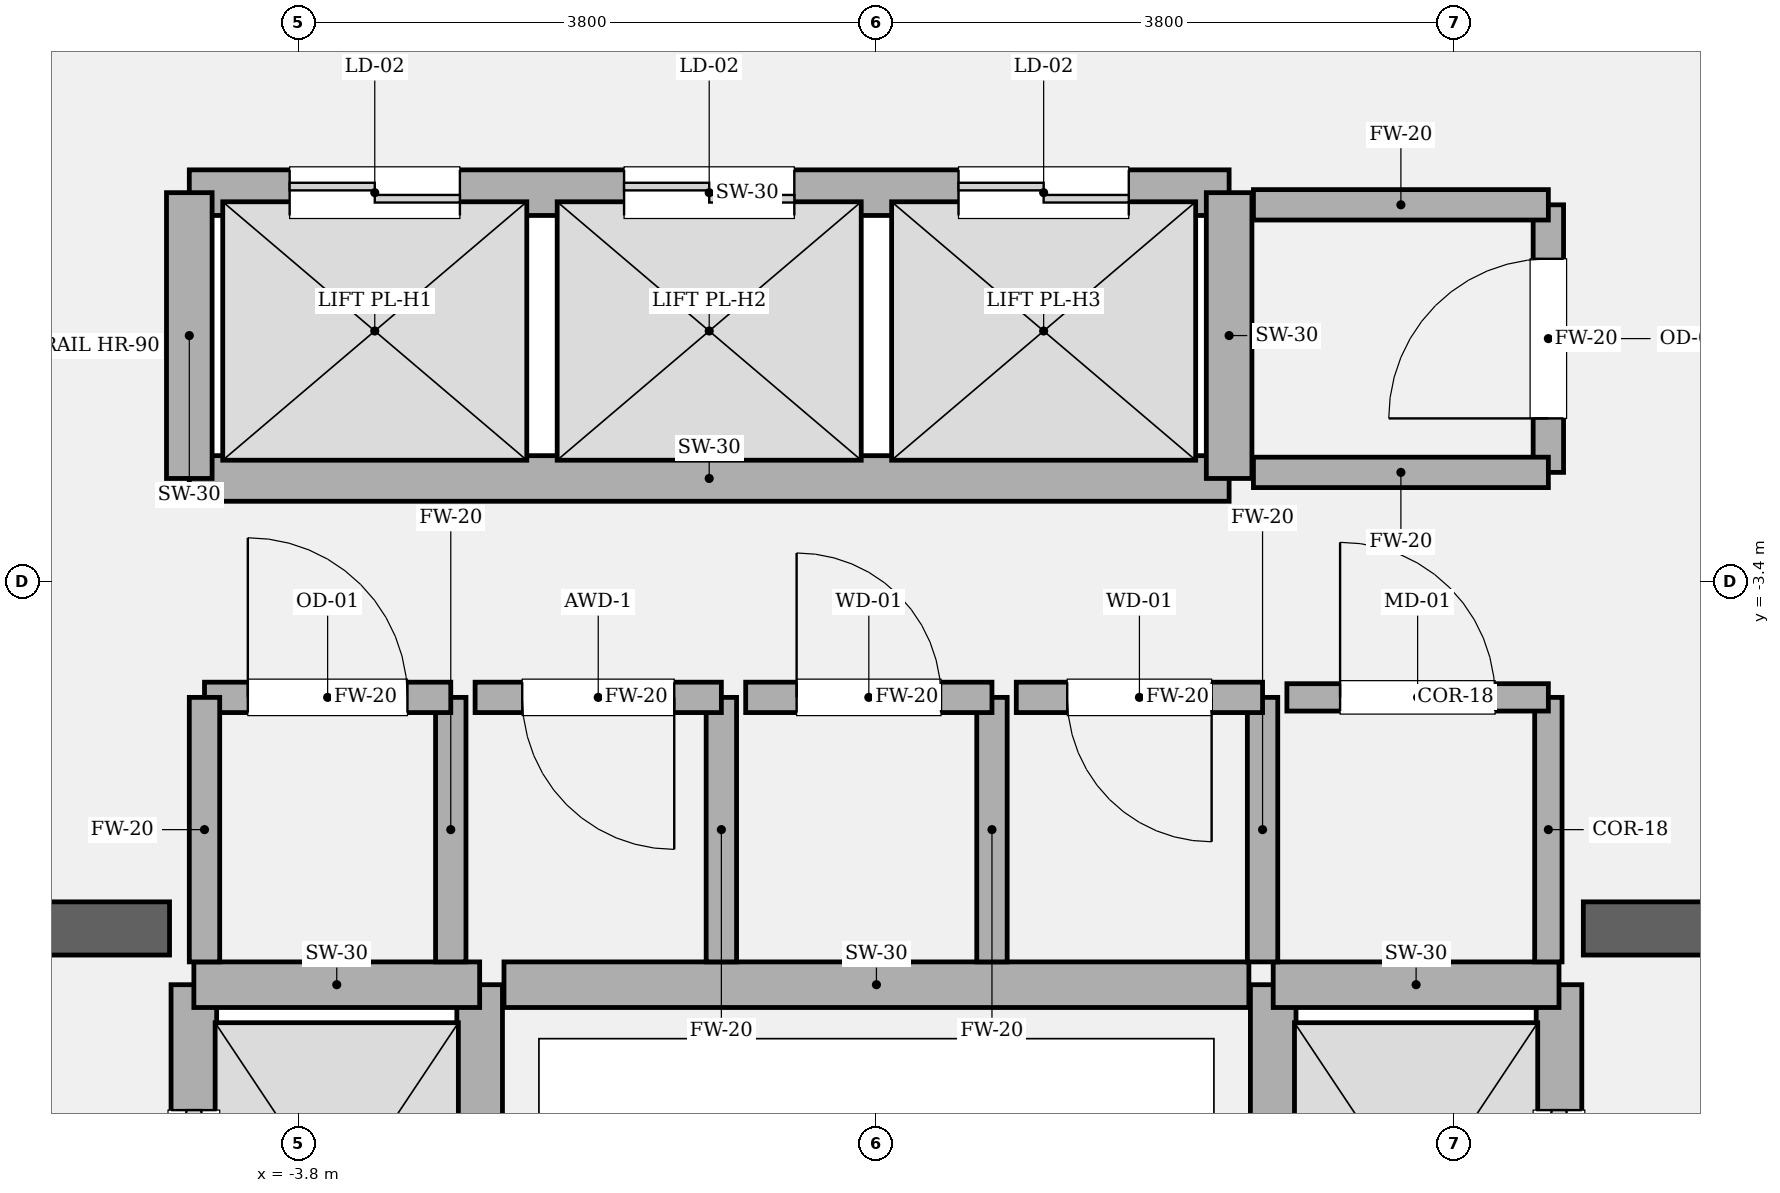
"""IFC4 building model, lengths in metres.
Left out: names, types, materials, properties, quantities, classifications, styles, units other than length and angle.
Written with IfcOpenShell. Run it as: python <this file> out.ifc"""

import sys

from ifc_helpers import new_model, si_unit, direction, frame, frame_2d, origin, place, context, subcontext, project, spatial, rectangle, extrude, element, fill, save


model = new_model("IFC4")
c1 = context("Model", 3, precision=1e-05, world=origin(), true_north=direction((0.0, 1.0)))
c2 = subcontext(c1, "Body", "Model", "MODEL_VIEW")
j1 = project(units=[si_unit("LENGTHUNIT", "METRE"), si_unit("PLANEANGLEUNIT", "RADIAN")], contexts=[c1])
p1 = place(None, origin())
s1 = spatial("IfcSite", under=j1, at=p1, CompositionType="ELEMENT")
p2 = place(p1, origin())
s2 = spatial("IfcBuilding", under=s1, at=p2, CompositionType="ELEMENT")
p3 = place(p2, frame((0.0, 0.0, 271.65)))
s3 = spatial("IfcBuildingStorey", under=s2, at=p3, CompositionType="ELEMENT", Elevation=271.65)
p4 = place(p3, frame((-9.925, -5.68, 0.0), z_axis=(0.0, 0.0, 1.0), x_axis=(1.0, 0.0, 0.0)))
e1 = element("IfcWall", 1, at=p4, inside=s3, PredefinedType="SOLIDWALL", context=c2, shape_type="SweptSolid", body=[
    extrude(rectangle(XDim=5.275, YDim=0.35, at=frame_2d((2.638, 0.0))), origin(), (0.0, 0.0, 1.0), 4.05),
])
p5 = place(p4, frame((1.385, 0.0, 0.0)))
e2 = element("IfcOpeningElement", 2, at=p5, cuts=e1, PredefinedType="OPENING", context=c2, shape_type="SweptSolid", body=[
    extrude(rectangle(XDim=1.18, YDim=2.2, at=frame_2d((0.59, 1.1))), frame((0.0, 0.185, 0.0), z_axis=(0.0, -1.0, 0.0), x_axis=(1.0, 0.0, 0.0)), (0.0, 0.0, 1.0), 0.37),
])
p6 = place(p3, frame((4.65, -5.68, 0.0), z_axis=(0.0, 0.0, 1.0), x_axis=(1.0, 0.0, 0.0)))
e3 = element("IfcWall", 3, at=p6, inside=s3, PredefinedType="SOLIDWALL", context=c2, shape_type="SweptSolid", body=[
    extrude(rectangle(XDim=5.275, YDim=0.35, at=frame_2d((2.638, 0.0))), origin(), (0.0, 0.0, 1.0), 4.05),
])
p7 = place(p6, frame((2.71, 0.0, 0.0)))
e4 = element("IfcOpeningElement", 4, at=p7, cuts=e3, PredefinedType="OPENING", context=c2, shape_type="SweptSolid", body=[
    extrude(rectangle(XDim=1.18, YDim=2.2, at=frame_2d((0.59, 1.1))), frame((0.0, 0.185, 0.0), z_axis=(0.0, -1.0, 0.0), x_axis=(1.0, 0.0, 0.0)), (0.0, 0.0, 1.0), 0.37),
])
p8 = place(p3, frame((-4.49, -8.82, 0.0), z_axis=(0.0, 0.0, 1.0), x_axis=(0.0, 1.0, 0.0)))
e5 = element("IfcWall", 5, at=p8, inside=s3, PredefinedType="SOLIDWALL", context=c2, shape_type="SweptSolid", body=[
    extrude(rectangle(XDim=2.77, YDim=0.3, at=frame_2d((1.385, 0.0))), origin(), (0.0, 0.0, 1.0), 3.85),
])
p9 = place(p8, frame((0.825, 0.0, 0.0)))
e6 = element("IfcOpeningElement", 6, at=p9, cuts=e5, PredefinedType="OPENING", context=c2, shape_type="SweptSolid", body=[
    extrude(rectangle(XDim=1.12, YDim=2.25, at=frame_2d((0.56, 1.125))), frame((0.0, 0.16, 0.0), z_axis=(0.0, -1.0, 0.0), x_axis=(1.0, 0.0, 0.0)), (0.0, 0.0, 1.0), 0.32),
])
p10 = place(p3, frame((-2.61, -8.82, 0.0), z_axis=(0.0, 0.0, 1.0), x_axis=(0.0, 1.0, 0.0)))
e7 = element("IfcWall", 7, at=p10, inside=s3, PredefinedType="SOLIDWALL", context=c2, shape_type="SweptSolid", body=[
    extrude(rectangle(XDim=2.77, YDim=0.3, at=frame_2d((1.385, 0.0))), origin(), (0.0, 0.0, 1.0), 3.85),
])
p11 = place(p3, frame((-4.49, -6.05, 0.0), z_axis=(0.0, 0.0, 1.0), x_axis=(1.0, 0.0, 0.0)))
e8 = element("IfcWall", 8, at=p11, inside=s3, PredefinedType="SOLIDWALL", context=c2, shape_type="SweptSolid", body=[
    extrude(rectangle(XDim=1.88, YDim=0.3, at=frame_2d((0.94, 0.0))), origin(), (0.0, 0.0, 1.0), 3.85),
])
p12 = place(p3, frame((4.49, -8.82, 0.0), z_axis=(0.0, 0.0, 1.0), x_axis=(0.0, 1.0, 0.0)))
e9 = element("IfcWall", 9, at=p12, inside=s3, PredefinedType="SOLIDWALL", context=c2, shape_type="SweptSolid", body=[
    extrude(rectangle(XDim=2.77, YDim=0.3, at=frame_2d((1.385, 0.0))), origin(), (0.0, 0.0, 1.0), 3.85),
])
p13 = place(p12, frame((0.825, 0.0, 0.0)))
e10 = element("IfcOpeningElement", 10, at=p13, cuts=e9, PredefinedType="OPENING", context=c2, shape_type="SweptSolid", body=[
    extrude(rectangle(XDim=1.12, YDim=2.25, at=frame_2d((0.56, 1.125))), frame((0.0, 0.16, 0.0), z_axis=(0.0, -1.0, 0.0), x_axis=(1.0, 0.0, 0.0)), (0.0, 0.0, 1.0), 0.32),
])
p14 = place(p3, frame((2.61, -8.82, 0.0), z_axis=(0.0, 0.0, 1.0), x_axis=(0.0, 1.0, 0.0)))
e11 = element("IfcWall", 11, at=p14, inside=s3, PredefinedType="SOLIDWALL", context=c2, shape_type="SweptSolid", body=[
    extrude(rectangle(XDim=2.77, YDim=0.3, at=frame_2d((1.385, 0.0))), origin(), (0.0, 0.0, 1.0), 3.85),
])
p15 = place(p3, frame((2.61, -6.05, 0.0), z_axis=(0.0, 0.0, 1.0), x_axis=(1.0, 0.0, 0.0)))
e12 = element("IfcWall", 12, at=p15, inside=s3, PredefinedType="SOLIDWALL", context=c2, shape_type="SweptSolid", body=[
    extrude(rectangle(XDim=1.88, YDim=0.3, at=frame_2d((0.94, 0.0))), origin(), (0.0, 0.0, 1.0), 3.85),
])
p16 = place(p3, frame((-4.52, -0.84, 0.0), z_axis=(0.0, 0.0, 1.0), x_axis=(1.0, 0.0, 0.0)))
e13 = element("IfcWall", 13, at=p16, inside=s3, PredefinedType="SOLIDWALL", context=c2, shape_type="SweptSolid", body=[
    extrude(rectangle(XDim=6.84, YDim=0.3, at=frame_2d((3.42, 0.0))), origin(), (0.0, 0.0, 1.0), 3.85),
])
p17 = place(p16, frame((0.66, 0.0, 0.0)))
e14 = element("IfcOpeningElement", 14, at=p17, cuts=e13, PredefinedType="OPENING", context=c2, shape_type="SweptSolid", body=[
    extrude(rectangle(XDim=1.12, YDim=2.25, at=frame_2d((0.56, 1.125))), frame((0.0, 0.16, 0.0), z_axis=(0.0, -1.0, 0.0), x_axis=(1.0, 0.0, 0.0)), (0.0, 0.0, 1.0), 0.32),
])
p18 = place(p16, frame((2.86, 0.0, 0.0)))
e15 = element("IfcOpeningElement", 15, at=p18, cuts=e13, PredefinedType="OPENING", context=c2, shape_type="SweptSolid", body=[
    extrude(rectangle(XDim=1.12, YDim=2.25, at=frame_2d((0.56, 1.125))), frame((0.0, 0.16, 0.0), z_axis=(0.0, -1.0, 0.0), x_axis=(1.0, 0.0, 0.0)), (0.0, 0.0, 1.0), 0.32),
])
p19 = place(p16, frame((5.06, 0.0, 0.0)))
e16 = element("IfcOpeningElement", 16, at=p19, cuts=e13, PredefinedType="OPENING", context=c2, shape_type="SweptSolid", body=[
    extrude(rectangle(XDim=1.12, YDim=2.25, at=frame_2d((0.56, 1.125))), frame((0.0, 0.16, 0.0), z_axis=(0.0, -1.0, 0.0), x_axis=(1.0, 0.0, 0.0)), (0.0, 0.0, 1.0), 0.32),
])
p20 = place(p3, frame((-4.52, -2.72, 0.0), z_axis=(0.0, 0.0, 1.0), x_axis=(1.0, 0.0, 0.0)))
e17 = element("IfcWall", 17, at=p20, inside=s3, PredefinedType="SOLIDWALL", context=c2, shape_type="SweptSolid", body=[
    extrude(rectangle(XDim=6.84, YDim=0.3, at=frame_2d((3.42, 0.0))), origin(), (0.0, 0.0, 1.0), 3.85),
])
for number, where, z_axis, x_axis in (
    (18, (-4.52, -2.72, 0.0), (0.0, 0.0, 1.0), (0.0, 1.0, 0.0)),
    (19, (2.32, -2.72, 0.0), (0.0, 0.0, 1.0), (0.0, 1.0, 0.0)),
):
    element("IfcWall", number, at=place(p3, frame(where, z_axis=z_axis, x_axis=x_axis)), inside=s3, PredefinedType="SOLIDWALL", context=c2, shape_type="SweptSolid", body=[
        extrude(rectangle(XDim=1.88, YDim=0.3, at=frame_2d((0.94, 0.0))), origin(), (0.0, 0.0, 1.0), 3.85),
    ])
p21 = place(p3, frame((-2.45, -6.05, 0.0), z_axis=(0.0, 0.0, 1.0), x_axis=(1.0, 0.0, 0.0)))
e20 = element("IfcWall", 20, at=p21, inside=s3, PredefinedType="SOLIDWALL", context=c2, shape_type="SweptSolid", body=[
    extrude(rectangle(XDim=4.9, YDim=0.3, at=frame_2d((2.45, 0.0))), origin(), (0.0, 0.0, 1.0), 3.85),
])
p22 = place(p3, frame((-2.8, -5.9, 0.0), z_axis=(0.0, 0.0, 1.0), x_axis=(0.0, 1.0, 0.0)))
e21 = element("IfcWall", 21, at=p22, inside=s3, PredefinedType="SOLIDWALL", context=c2, shape_type="SweptSolid", body=[
    extrude(rectangle(XDim=1.74, YDim=0.2, at=frame_2d((0.87, 0.0))), origin(), (0.0, 0.0, 1.0), 3.85),
])
p23 = place(p3, frame((-2.8, -4.16, 0.0), z_axis=(0.0, 0.0, 1.0), x_axis=(-1.0, 0.0, 0.0)))
e22 = element("IfcWall", 22, at=p23, inside=s3, PredefinedType="SOLIDWALL", context=c2, shape_type="SweptSolid", body=[
    extrude(rectangle(XDim=1.62, YDim=0.2, at=frame_2d((0.81, 0.0))), origin(), (0.0, 0.0, 1.0), 3.85),
])
p24 = place(p23, frame((0.285, 0.0, 0.0)))
e23 = element("IfcOpeningElement", 23, at=p24, cuts=e22, PredefinedType="OPENING", context=c2, shape_type="SweptSolid", body=[
    extrude(rectangle(XDim=1.05, YDim=2.2, at=frame_2d((0.525, 1.1))), frame((0.0, 0.11, 0.0), z_axis=(0.0, -1.0, 0.0), x_axis=(1.0, 0.0, 0.0)), (0.0, 0.0, 1.0), 0.22),
])
for number, where, z_axis, x_axis in (
    (24, (-4.42, -4.16, 0.0), (0.0, 0.0, 1.0), (0.0, -1.0, 0.0)),
    (25, (-1.02, -5.9, 0.0), (0.0, 0.0, 1.0), (0.0, 1.0, 0.0)),
):
    element("IfcWall", number, at=place(p3, frame(where, z_axis=z_axis, x_axis=x_axis)), inside=s3, PredefinedType="SOLIDWALL", context=c2, shape_type="SweptSolid", body=[
        extrude(rectangle(XDim=1.74, YDim=0.2, at=frame_2d((0.87, 0.0))), origin(), (0.0, 0.0, 1.0), 3.85),
    ])
p25 = place(p3, frame((-1.02, -4.16, 0.0), z_axis=(0.0, 0.0, 1.0), x_axis=(-1.0, 0.0, 0.0)))
e26 = element("IfcWall", 26, at=p25, inside=s3, PredefinedType="SOLIDWALL", context=c2, shape_type="SweptSolid", body=[
    extrude(rectangle(XDim=1.62, YDim=0.2, at=frame_2d((0.81, 0.0))), origin(), (0.0, 0.0, 1.0), 3.85),
])
p26 = place(p25, frame((0.31, 0.0, 0.0)))
e27 = element("IfcOpeningElement", 27, at=p26, cuts=e26, PredefinedType="OPENING", context=c2, shape_type="SweptSolid", body=[
    extrude(rectangle(XDim=1.0, YDim=2.15, at=frame_2d((0.5, 1.075))), frame((0.0, 0.11, 0.0), z_axis=(0.0, -1.0, 0.0), x_axis=(1.0, 0.0, 0.0)), (0.0, 0.0, 1.0), 0.22),
])
p27 = place(p3, frame((0.76, -5.9, 0.0), z_axis=(0.0, 0.0, 1.0), x_axis=(0.0, 1.0, 0.0)))
e28 = element("IfcWall", 28, at=p27, inside=s3, PredefinedType="SOLIDWALL", context=c2, shape_type="SweptSolid", body=[
    extrude(rectangle(XDim=1.74, YDim=0.2, at=frame_2d((0.87, 0.0))), origin(), (0.0, 0.0, 1.0), 3.85),
])
p28 = place(p3, frame((0.76, -4.16, 0.0), z_axis=(0.0, 0.0, 1.0), x_axis=(-1.0, 0.0, 0.0)))
e29 = element("IfcWall", 29, at=p28, inside=s3, PredefinedType="SOLIDWALL", context=c2, shape_type="SweptSolid", body=[
    extrude(rectangle(XDim=1.62, YDim=0.2, at=frame_2d((0.81, 0.0))), origin(), (0.0, 0.0, 1.0), 3.85),
])
p29 = place(p28, frame((0.335, 0.0, 0.0)))
e30 = element("IfcOpeningElement", 30, at=p29, cuts=e29, PredefinedType="OPENING", context=c2, shape_type="SweptSolid", body=[
    extrude(rectangle(XDim=0.95, YDim=2.15, at=frame_2d((0.475, 1.075))), frame((0.0, 0.11, 0.0), z_axis=(0.0, -1.0, 0.0), x_axis=(1.0, 0.0, 0.0)), (0.0, 0.0, 1.0), 0.22),
])
p30 = place(p3, frame((2.54, -5.9, 0.0), z_axis=(0.0, 0.0, 1.0), x_axis=(0.0, 1.0, 0.0)))
e31 = element("IfcWall", 31, at=p30, inside=s3, PredefinedType="SOLIDWALL", context=c2, shape_type="SweptSolid", body=[
    extrude(rectangle(XDim=1.74, YDim=0.2, at=frame_2d((0.87, 0.0))), origin(), (0.0, 0.0, 1.0), 3.85),
])
p31 = place(p3, frame((2.54, -4.16, 0.0), z_axis=(0.0, 0.0, 1.0), x_axis=(-1.0, 0.0, 0.0)))
e32 = element("IfcWall", 32, at=p31, inside=s3, PredefinedType="SOLIDWALL", context=c2, shape_type="SweptSolid", body=[
    extrude(rectangle(XDim=1.62, YDim=0.2, at=frame_2d((0.81, 0.0))), origin(), (0.0, 0.0, 1.0), 3.85),
])
p32 = place(p31, frame((0.335, 0.0, 0.0)))
e33 = element("IfcOpeningElement", 33, at=p32, cuts=e32, PredefinedType="OPENING", context=c2, shape_type="SweptSolid", body=[
    extrude(rectangle(XDim=0.95, YDim=2.15, at=frame_2d((0.475, 1.075))), frame((0.0, 0.11, 0.0), z_axis=(0.0, -1.0, 0.0), x_axis=(1.0, 0.0, 0.0)), (0.0, 0.0, 1.0), 0.22),
])
p33 = place(p3, frame((4.42, -5.9, 0.0), z_axis=(0.0, 0.0, 1.0), x_axis=(0.0, 1.0, 0.0)))
e34 = element("IfcWall", 34, at=p33, inside=s3, PredefinedType="PARTITIONING", context=c2, shape_type="SweptSolid", body=[
    extrude(rectangle(XDim=1.74, YDim=0.18, at=frame_2d((0.87, 0.0))), origin(), (0.0, 0.0, 1.0), 3.85),
])
p34 = place(p3, frame((4.42, -4.16, 0.0), z_axis=(0.0, 0.0, 1.0), x_axis=(-1.0, 0.0, 0.0)))
e35 = element("IfcWall", 35, at=p34, inside=s3, PredefinedType="PARTITIONING", context=c2, shape_type="SweptSolid", body=[
    extrude(rectangle(XDim=1.72, YDim=0.18, at=frame_2d((0.86, 0.0))), origin(), (0.0, 0.0, 1.0), 3.85),
])
p35 = place(p34, frame((0.35, 0.0, 0.0)))
e36 = element("IfcOpeningElement", 36, at=p35, cuts=e35, PredefinedType="OPENING", context=c2, shape_type="SweptSolid", body=[
    extrude(rectangle(XDim=1.02, YDim=2.2, at=frame_2d((0.51, 1.1))), frame((0.0, 0.1, 0.0), z_axis=(0.0, -1.0, 0.0), x_axis=(1.0, 0.0, 0.0)), (0.0, 0.0, 1.0), 0.2),
])
p36 = place(p3, frame((4.42, -2.68, 0.0), z_axis=(0.0, 0.0, 1.0), x_axis=(0.0, 1.0, 0.0)))
e37 = element("IfcWall", 37, at=p36, inside=s3, PredefinedType="SOLIDWALL", context=c2, shape_type="SweptSolid", body=[
    extrude(rectangle(XDim=1.76, YDim=0.2, at=frame_2d((0.88, 0.0))), origin(), (0.0, 0.0, 1.0), 3.85),
])
p37 = place(p36, frame((0.355, 0.0, 0.0)))
e38 = element("IfcOpeningElement", 38, at=p37, cuts=e37, PredefinedType="OPENING", context=c2, shape_type="SweptSolid", body=[
    extrude(rectangle(XDim=1.05, YDim=2.2, at=frame_2d((0.525, 1.1))), frame((0.0, 0.11, 0.0), z_axis=(0.0, -1.0, 0.0), x_axis=(1.0, 0.0, 0.0)), (0.0, 0.0, 1.0), 0.22),
])
for number, where, z_axis, x_axis in (
    (39, (4.42, -0.92, 0.0), (0.0, 0.0, 1.0), (-1.0, 0.0, 0.0)),
    (40, (2.48, -2.68, 0.0), (0.0, 0.0, 1.0), (1.0, 0.0, 0.0)),
):
    element("IfcWall", number, at=place(p3, frame(where, z_axis=z_axis, x_axis=x_axis)), inside=s3, PredefinedType="SOLIDWALL", context=c2, shape_type="SweptSolid", body=[
        extrude(rectangle(XDim=1.94, YDim=0.2, at=frame_2d((0.97, 0.0))), origin(), (0.0, 0.0, 1.0), 3.85),
    ])
p38 = place(p9, origin())
e41 = element("IfcDoor", 41, at=p38, inside=s3, OperationType="SLIDING_TO_LEFT", PredefinedType="DOOR", context=c2, shape_type="SweptSolid", body=[
    extrude(rectangle(XDim=1.12, YDim=2.25, at=frame_2d((0.56, 1.125))), frame((0.0, 0.025, 0.0), z_axis=(0.0, -1.0, 0.0), x_axis=(1.0, 0.0, 0.0)), (0.0, 0.0, 1.0), 0.05),
])
fill(e6, e41)
p39 = place(p13, origin())
e42 = element("IfcDoor", 42, at=p39, inside=s3, OperationType="SLIDING_TO_RIGHT", PredefinedType="DOOR", context=c2, shape_type="SweptSolid", body=[
    extrude(rectangle(XDim=1.12, YDim=2.25, at=frame_2d((0.56, 1.125))), frame((0.0, 0.025, 0.0), z_axis=(0.0, -1.0, 0.0), x_axis=(1.0, 0.0, 0.0)), (0.0, 0.0, 1.0), 0.05),
])
fill(e10, e42)
p40 = place(p17, origin())
e43 = element("IfcDoor", 43, at=p40, inside=s3, OperationType="DOUBLE_DOOR_SLIDING", PredefinedType="DOOR", context=c2, shape_type="SweptSolid", body=[
    extrude(rectangle(XDim=1.12, YDim=2.25, at=frame_2d((0.56, 1.125))), frame((0.0, 0.025, 0.0), z_axis=(0.0, -1.0, 0.0), x_axis=(1.0, 0.0, 0.0)), (0.0, 0.0, 1.0), 0.05),
])
fill(e14, e43)
p41 = place(p18, origin())
e44 = element("IfcDoor", 44, at=p41, inside=s3, OperationType="DOUBLE_DOOR_SLIDING", PredefinedType="DOOR", context=c2, shape_type="SweptSolid", body=[
    extrude(rectangle(XDim=1.12, YDim=2.25, at=frame_2d((0.56, 1.125))), frame((0.0, 0.025, 0.0), z_axis=(0.0, -1.0, 0.0), x_axis=(1.0, 0.0, 0.0)), (0.0, 0.0, 1.0), 0.05),
])
fill(e15, e44)
p42 = place(p19, origin())
e45 = element("IfcDoor", 45, at=p42, inside=s3, OperationType="DOUBLE_DOOR_SLIDING", PredefinedType="DOOR", context=c2, shape_type="SweptSolid", body=[
    extrude(rectangle(XDim=1.12, YDim=2.25, at=frame_2d((0.56, 1.125))), frame((0.0, 0.025, 0.0), z_axis=(0.0, -1.0, 0.0), x_axis=(1.0, 0.0, 0.0)), (0.0, 0.0, 1.0), 0.05),
])
fill(e16, e45)
p43 = place(p24, origin())
e46 = element("IfcDoor", 46, at=p43, inside=s3, OperationType="SINGLE_SWING_RIGHT", PredefinedType="DOOR", context=c2, shape_type="SweptSolid", body=[
    extrude(rectangle(XDim=1.05, YDim=2.2, at=frame_2d((0.525, 1.1))), frame((0.0, 0.025, 0.0), z_axis=(0.0, -1.0, 0.0), x_axis=(1.0, 0.0, 0.0)), (0.0, 0.0, 1.0), 0.05),
])
fill(e23, e46)
p44 = place(p26, origin())
e47 = element("IfcDoor", 47, at=p44, inside=s3, OperationType="SINGLE_SWING_LEFT", PredefinedType="DOOR", context=c2, shape_type="SweptSolid", body=[
    extrude(rectangle(XDim=1.0, YDim=2.15, at=frame_2d((0.5, 1.075))), frame((0.0, 0.025, 0.0), z_axis=(0.0, -1.0, 0.0), x_axis=(1.0, 0.0, 0.0)), (0.0, 0.0, 1.0), 0.05),
])
fill(e27, e47)
p45 = place(p29, origin())
e48 = element("IfcDoor", 48, at=p45, inside=s3, OperationType="SINGLE_SWING_RIGHT", PredefinedType="DOOR", context=c2, shape_type="SweptSolid", body=[
    extrude(rectangle(XDim=0.95, YDim=2.15, at=frame_2d((0.475, 1.075))), frame((0.0, 0.025, 0.0), z_axis=(0.0, -1.0, 0.0), x_axis=(1.0, 0.0, 0.0)), (0.0, 0.0, 1.0), 0.05),
])
fill(e30, e48)
p46 = place(p32, origin())
e49 = element("IfcDoor", 49, at=p46, inside=s3, OperationType="SINGLE_SWING_LEFT", PredefinedType="DOOR", context=c2, shape_type="SweptSolid", body=[
    extrude(rectangle(XDim=0.95, YDim=2.15, at=frame_2d((0.475, 1.075))), frame((0.0, 0.025, 0.0), z_axis=(0.0, -1.0, 0.0), x_axis=(1.0, 0.0, 0.0)), (0.0, 0.0, 1.0), 0.05),
])
fill(e33, e49)
p47 = place(p35, origin())
e50 = element("IfcDoor", 50, at=p47, inside=s3, OperationType="SINGLE_SWING_RIGHT", PredefinedType="DOOR", context=c2, shape_type="SweptSolid", body=[
    extrude(rectangle(XDim=1.02, YDim=2.2, at=frame_2d((0.51, 1.1))), frame((0.0, 0.025, 0.0), z_axis=(0.0, -1.0, 0.0), x_axis=(1.0, 0.0, 0.0)), (0.0, 0.0, 1.0), 0.05),
])
fill(e36, e50)
p48 = place(p37, origin())
e51 = element("IfcDoor", 51, at=p48, inside=s3, OperationType="SINGLE_SWING_LEFT", PredefinedType="DOOR", context=c2, shape_type="SweptSolid", body=[
    extrude(rectangle(XDim=1.05, YDim=2.2, at=frame_2d((0.525, 1.1))), frame((0.0, 0.025, 0.0), z_axis=(0.0, -1.0, 0.0), x_axis=(1.0, 0.0, 0.0)), (0.0, 0.0, 1.0), 0.05),
])
fill(e38, e51)
save(model, sys.argv[1])
